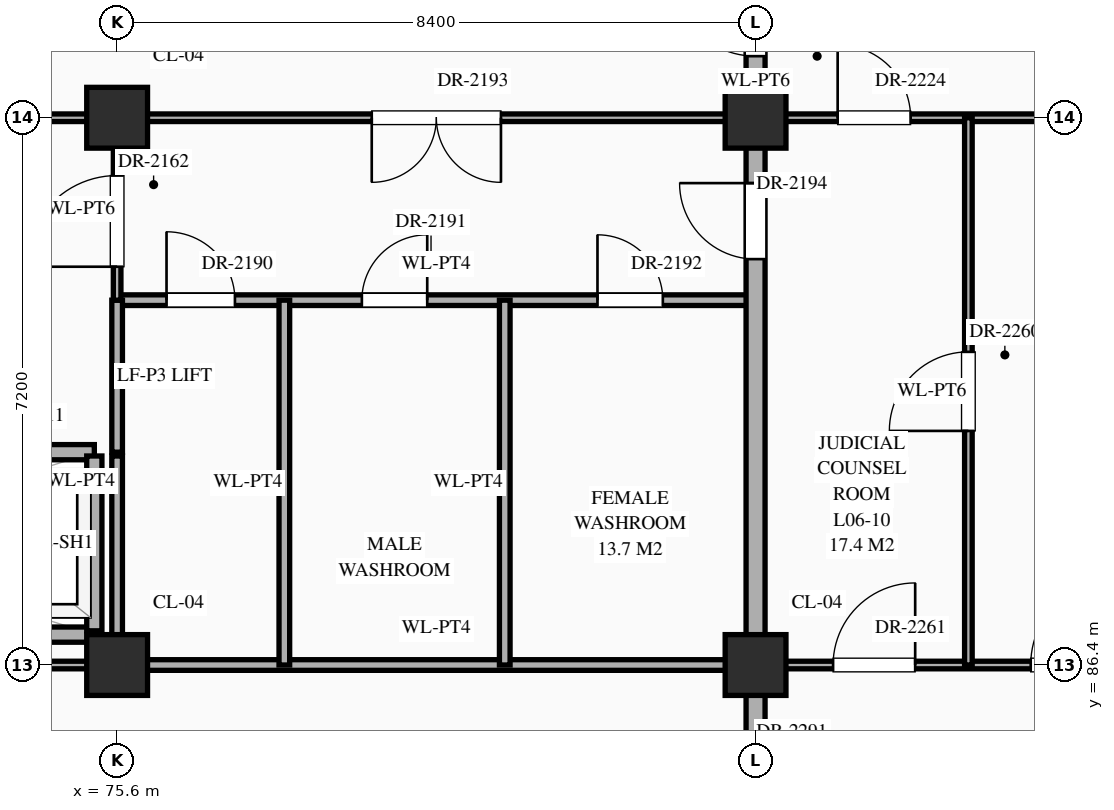
"""IFC4 building model, lengths in metres.
Left out: names, types, materials, properties, quantities, classifications, styles, units other than length and angle.
Written with IfcOpenShell. Run it as: python <this file> out.ifc"""

import sys

from ifc_helpers import new_model, si_unit, direction, frame, frame_2d, origin, origin_2d, place, context, subcontext, project, spatial, rectangle, extrude, element, fill, save


model = new_model("IFC4")
c1 = context("Model", 3, precision=1e-05, world=origin(), true_north=direction((0.0, 1.0)))
c2 = subcontext(c1, "Body", "Model", "MODEL_VIEW")
j1 = project(units=[si_unit("LENGTHUNIT", "METRE"), si_unit("PLANEANGLEUNIT", "RADIAN")], contexts=[c1])
p1 = place(None, origin())
s1 = spatial("IfcSite", under=j1, at=p1, CompositionType="ELEMENT")
p2 = place(p1, origin())
s2 = spatial("IfcBuilding", under=s1, at=p2, CompositionType="ELEMENT")
p3 = place(p2, frame((0.0, 0.0, 26.1)))
s3 = spatial("IfcBuildingStorey", under=s2, at=p3, CompositionType="ELEMENT", Elevation=26.1)
for number, where, z_axis, x_axis in (
    (1, (75.6, 86.4, 0.0), (0.0, 0.0, 1.0), (1.0, 0.0, 0.0)),
    (2, (75.6, 93.6, 0.0), (0.0, 0.0, 1.0), (1.0, 0.0, 0.0)),
    (3, (84.0, 86.4, 0.0), (0.0, 0.0, 1.0), (1.0, 0.0, 0.0)),
    (4, (84.0, 93.6, 0.0), (0.0, 0.0, 1.0), (1.0, 0.0, 0.0)),
):
    element("IfcColumn", number, at=place(p3, frame(where, z_axis=z_axis, x_axis=x_axis)), inside=s3, PredefinedType="COLUMN", context=c2, shape_type="SweptSolid", body=[
        extrude(rectangle(XDim=0.8, YDim=0.8, at=origin_2d()), origin(), (0.0, 0.0, 1.0), 4.5),
    ])
p4 = place(p3, frame((67.25, 86.4, 0.0), z_axis=(0.0, 0.0, 1.0), x_axis=(1.0, 0.0, 0.0)))
e5 = element("IfcWall", 5, at=p4, inside=s3, PredefinedType="STANDARD", context=c2, shape_type="SweptSolid", body=[
    extrude(rectangle(XDim=8.3, YDim=0.1, at=frame_2d((4.15, 0.0))), origin(), (0.0, 0.0, 1.0), 3.39),
])
p5 = place(p3, frame((75.6, 86.4, 0.0), z_axis=(0.0, 0.0, 1.0), x_axis=(1.0, 0.0, 0.0)))
e6 = element("IfcWall", 6, at=p5, inside=s3, PredefinedType="STANDARD", context=c2, shape_type="SweptSolid", body=[
    extrude(rectangle(XDim=8.4, YDim=0.14, at=frame_2d((4.2, 0.0))), origin(), (0.0, 0.0, 1.0), 3.39),
])
p6 = place(p3, frame((84.0, 86.4, 0.0), z_axis=(0.0, 0.0, 1.0), x_axis=(1.0, 0.0, 0.0)))
e7 = element("IfcWall", 7, at=p6, inside=s3, PredefinedType="STANDARD", context=c2, shape_type="SweptSolid", body=[
    extrude(rectangle(XDim=8.4, YDim=0.1, at=frame_2d((4.2, 0.0))), origin(), (0.0, 0.0, 1.0), 3.39),
])
p7 = place(p6, frame((1.02, 0.0, 0.0)))
e8 = element("IfcOpeningElement", 8, at=p7, cuts=e7, PredefinedType="OPENING", context=c2, shape_type="SweptSolid", body=[
    extrude(rectangle(XDim=1.08, YDim=2.25, at=frame_2d((0.54, 1.125))), frame((0.0, 0.062, 0.0), z_axis=(0.0, -1.0, 0.0), x_axis=(1.0, 0.0, 0.0)), (0.0, 0.0, 1.0), 0.124),
])
p8 = place(p6, frame((3.62, 0.0, 0.0)))
e9 = element("IfcOpeningElement", 9, at=p8, cuts=e7, PredefinedType="OPENING", context=c2, shape_type="SweptSolid", body=[
    extrude(rectangle(XDim=1.16, YDim=2.3, at=frame_2d((0.58, 1.15))), frame((0.0, 0.062, 0.0), z_axis=(0.0, -1.0, 0.0), x_axis=(1.0, 0.0, 0.0)), (0.0, 0.0, 1.0), 0.124),
])
p9 = place(p6, frame((6.24, 0.0, 0.0)))
e10 = element("IfcOpeningElement", 10, at=p9, cuts=e7, PredefinedType="OPENING", context=c2, shape_type="SweptSolid", body=[
    extrude(rectangle(XDim=1.2, YDim=2.35, at=frame_2d((0.6, 1.175))), frame((0.0, 0.062, 0.0), z_axis=(0.0, -1.0, 0.0), x_axis=(1.0, 0.0, 0.0)), (0.0, 0.0, 1.0), 0.124),
])
p10 = place(p3, frame((72.8, 86.8, 0.0), z_axis=(0.0, 0.0, 1.0), x_axis=(1.0, 0.0, 0.0)))
e11 = element("IfcWall", 11, at=p10, inside=s3, PredefinedType="STANDARD", context=c2, shape_type="SweptSolid", body=[
    extrude(rectangle(XDim=2.5, YDim=0.2, at=frame_2d((1.25, 0.0))), origin(), (0.0, 0.0, 1.0), 4.24),
])
p11 = place(p3, frame((67.6, 89.2, 0.0), z_axis=(0.0, 0.0, 1.0), x_axis=(1.0, 0.0, 0.0)))
e12 = element("IfcWall", 12, at=p11, inside=s3, PredefinedType="STANDARD", context=c2, shape_type="SweptSolid", body=[
    extrude(rectangle(XDim=7.7, YDim=0.2, at=frame_2d((3.85, 0.0))), origin(), (0.0, 0.0, 1.0), 4.24),
])
p12 = place(p11, frame((0.725, 0.0, 0.0)))
e13 = element("IfcOpeningElement", 13, at=p12, cuts=e12, PredefinedType="OPENING", context=c2, shape_type="SweptSolid", body=[
    extrude(rectangle(XDim=1.1, YDim=2.15, at=frame_2d((0.55, 1.075))), frame((0.0, 0.112, 0.0), z_axis=(0.0, -1.0, 0.0), x_axis=(1.0, 0.0, 0.0)), (0.0, 0.0, 1.0), 0.224),
])
p13 = place(p11, frame((3.3, 0.0, 0.0)))
e14 = element("IfcOpeningElement", 14, at=p13, cuts=e12, PredefinedType="OPENING", context=c2, shape_type="SweptSolid", body=[
    extrude(rectangle(XDim=1.1, YDim=2.15, at=frame_2d((0.55, 1.075))), frame((0.0, 0.112, 0.0), z_axis=(0.0, -1.0, 0.0), x_axis=(1.0, 0.0, 0.0)), (0.0, 0.0, 1.0), 0.224),
])
p14 = place(p11, frame((5.875, 0.0, 0.0)))
e15 = element("IfcOpeningElement", 15, at=p14, cuts=e12, PredefinedType="OPENING", context=c2, shape_type="SweptSolid", body=[
    extrude(rectangle(XDim=1.1, YDim=2.15, at=frame_2d((0.55, 1.075))), frame((0.0, 0.112, 0.0), z_axis=(0.0, -1.0, 0.0), x_axis=(1.0, 0.0, 0.0)), (0.0, 0.0, 1.0), 0.224),
])
p15 = place(p3, frame((75.6, 91.2, 0.0), z_axis=(0.0, 0.0, 1.0), x_axis=(1.0, 0.0, 0.0)))
e16 = element("IfcWall", 16, at=p15, inside=s3, PredefinedType="STANDARD", context=c2, shape_type="SweptSolid", body=[
    extrude(rectangle(XDim=8.4, YDim=0.14, at=frame_2d((4.2, 0.0))), origin(), (0.0, 0.0, 1.0), 4.24),
])
p16 = place(p15, frame((0.65, 0.0, 0.0)))
e17 = element("IfcOpeningElement", 17, at=p16, cuts=e16, PredefinedType="OPENING", context=c2, shape_type="SweptSolid", body=[
    extrude(rectangle(XDim=0.9, YDim=2.15, at=frame_2d((0.45, 1.075))), frame((0.0, 0.082, 0.0), z_axis=(0.0, -1.0, 0.0), x_axis=(1.0, 0.0, 0.0)), (0.0, 0.0, 1.0), 0.164),
])
p17 = place(p15, frame((3.22, 0.0, 0.0)))
e18 = element("IfcOpeningElement", 18, at=p17, cuts=e16, PredefinedType="OPENING", context=c2, shape_type="SweptSolid", body=[
    extrude(rectangle(XDim=0.86, YDim=2.1, at=frame_2d((0.43, 1.05))), frame((0.0, 0.082, 0.0), z_axis=(0.0, -1.0, 0.0), x_axis=(1.0, 0.0, 0.0)), (0.0, 0.0, 1.0), 0.164),
])
p18 = place(p15, frame((6.32, 0.0, 0.0)))
e19 = element("IfcOpeningElement", 19, at=p18, cuts=e16, PredefinedType="OPENING", context=c2, shape_type="SweptSolid", body=[
    extrude(rectangle(XDim=0.86, YDim=2.1, at=frame_2d((0.43, 1.05))), frame((0.0, 0.082, 0.0), z_axis=(0.0, -1.0, 0.0), x_axis=(1.0, 0.0, 0.0)), (0.0, 0.0, 1.0), 0.164),
])
p19 = place(p3, frame((67.2, 93.6, 0.0), z_axis=(0.0, 0.0, 1.0), x_axis=(1.0, 0.0, 0.0)))
e20 = element("IfcWall", 20, at=p19, inside=s3, PredefinedType="STANDARD", context=c2, shape_type="SweptSolid", body=[
    extrude(rectangle(XDim=33.6, YDim=0.1, at=frame_2d((16.8, 0.0))), origin(), (0.0, 0.0, 1.0), 3.39),
])
p20 = place(p19, frame((3.35, 0.0, 0.0)))
e21 = element("IfcOpeningElement", 21, at=p20, cuts=e20, PredefinedType="OPENING", context=c2, shape_type="SweptSolid", body=[
    extrude(rectangle(XDim=1.7, YDim=2.45, at=frame_2d((0.85, 1.225))), frame((0.0, 0.062, 0.0), z_axis=(0.0, -1.0, 0.0), x_axis=(1.0, 0.0, 0.0)), (0.0, 0.0, 1.0), 0.124),
])
p21 = place(p19, frame((28.675, 0.0, 0.0)))
e22 = element("IfcOpeningElement", 22, at=p21, cuts=e20, PredefinedType="OPENING", context=c2, shape_type="SweptSolid", body=[
    extrude(rectangle(XDim=1.45, YDim=2.3, at=frame_2d((0.725, 1.15))), frame((0.0, 0.062, 0.0), z_axis=(0.0, -1.0, 0.0), x_axis=(1.0, 0.0, 0.0)), (0.0, 0.0, 1.0), 0.124),
])
p22 = place(p19, frame((11.75, 0.0, 0.0)))
e23 = element("IfcOpeningElement", 23, at=p22, cuts=e20, PredefinedType="OPENING", context=c2, shape_type="SweptSolid", body=[
    extrude(rectangle(XDim=1.7, YDim=2.45, at=frame_2d((0.85, 1.225))), frame((0.0, 0.062, 0.0), z_axis=(0.0, -1.0, 0.0), x_axis=(1.0, 0.0, 0.0)), (0.0, 0.0, 1.0), 0.124),
])
p23 = place(p19, frame((17.88, 0.0, 0.0)))
e24 = element("IfcOpeningElement", 24, at=p23, cuts=e20, PredefinedType="OPENING", context=c2, shape_type="SweptSolid", body=[
    extrude(rectangle(XDim=0.96, YDim=2.2, at=frame_2d((0.48, 1.1))), frame((0.0, 0.062, 0.0), z_axis=(0.0, -1.0, 0.0), x_axis=(1.0, 0.0, 0.0)), (0.0, 0.0, 1.0), 0.124),
])
p24 = place(p19, frame((20.5, 0.0, 0.0)))
e25 = element("IfcOpeningElement", 25, at=p24, cuts=e20, PredefinedType="OPENING", context=c2, shape_type="SweptSolid", body=[
    extrude(rectangle(XDim=1.0, YDim=2.25, at=frame_2d((0.5, 1.125))), frame((0.0, 0.062, 0.0), z_axis=(0.0, -1.0, 0.0), x_axis=(1.0, 0.0, 0.0)), (0.0, 0.0, 1.0), 0.124),
])
p25 = place(p19, frame((23.12, 0.0, 0.0)))
e26 = element("IfcOpeningElement", 26, at=p25, cuts=e20, PredefinedType="OPENING", context=c2, shape_type="SweptSolid", body=[
    extrude(rectangle(XDim=1.04, YDim=2.2, at=frame_2d((0.52, 1.1))), frame((0.0, 0.062, 0.0), z_axis=(0.0, -1.0, 0.0), x_axis=(1.0, 0.0, 0.0)), (0.0, 0.0, 1.0), 0.124),
])
p26 = place(p3, frame((75.3, 86.85, 0.0), z_axis=(0.0, 0.0, 1.0), x_axis=(0.0, 1.0, 0.0)))
e27 = element("IfcWall", 27, at=p26, inside=s3, PredefinedType="STANDARD", context=c2, shape_type="SweptSolid", body=[
    extrude(rectangle(XDim=2.3, YDim=0.2, at=frame_2d((1.15, 0.0))), origin(), (0.0, 0.0, 1.0), 4.24),
])
p27 = place(p3, frame((75.6, 86.45, 0.0), z_axis=(0.0, 0.0, 1.0), x_axis=(0.0, 1.0, 0.0)))
e28 = element("IfcWall", 28, at=p27, inside=s3, PredefinedType="STANDARD", context=c2, shape_type="SweptSolid", body=[
    extrude(rectangle(XDim=2.7, YDim=0.14, at=frame_2d((1.35, 0.0))), origin(), (0.0, 0.0, 1.0), 3.49),
])
p28 = place(p3, frame((75.6, 89.2, 0.0), z_axis=(0.0, 0.0, 1.0), x_axis=(0.0, 1.0, 0.0)))
e29 = element("IfcWall", 29, at=p28, inside=s3, PredefinedType="STANDARD", context=c2, shape_type="SweptSolid", body=[
    extrude(rectangle(XDim=2.0, YDim=0.14, at=frame_2d((1.0, 0.0))), origin(), (0.0, 0.0, 1.0), 3.49),
])
p29 = place(p3, frame((75.6, 91.2, 0.0), z_axis=(0.0, 0.0, 1.0), x_axis=(0.0, 1.0, 0.0)))
e30 = element("IfcWall", 30, at=p29, inside=s3, PredefinedType="STANDARD", context=c2, shape_type="SweptSolid", body=[
    extrude(rectangle(XDim=2.4, YDim=0.1, at=frame_2d((1.2, 0.0))), origin(), (0.0, 0.0, 1.0), 3.49),
])
p30 = place(p29, frame((0.44, 0.0, 0.0)))
e31 = element("IfcOpeningElement", 31, at=p30, cuts=e30, PredefinedType="OPENING", context=c2, shape_type="SweptSolid", body=[
    extrude(rectangle(XDim=1.2, YDim=2.35, at=frame_2d((0.6, 1.175))), frame((0.0, 0.062, 0.0), z_axis=(0.0, -1.0, 0.0), x_axis=(1.0, 0.0, 0.0)), (0.0, 0.0, 1.0), 0.124),
])
for number, where, z_axis, x_axis in (
    (32, (77.8, 86.4, 0.0), (0.0, 0.0, 1.0), (0.0, 1.0, 0.0)),
    (33, (80.7, 86.4, 0.0), (0.0, 0.0, 1.0), (0.0, 1.0, 0.0)),
):
    element("IfcWall", number, at=place(p3, frame(where, z_axis=z_axis, x_axis=x_axis)), inside=s3, PredefinedType="STANDARD", context=c2, shape_type="SweptSolid", body=[
        extrude(rectangle(XDim=4.8, YDim=0.14, at=frame_2d((2.4, 0.0))), origin(), (0.0, 0.0, 1.0), 4.24),
    ])
p31 = place(p3, frame((84.0, 79.24, 0.0), z_axis=(0.0, 0.0, 1.0), x_axis=(0.0, 1.0, 0.0)))
e34 = element("IfcWall", 34, at=p31, inside=s3, PredefinedType="STANDARD", context=c2, shape_type="SweptSolid", body=[
    extrude(rectangle(XDim=35.92, YDim=0.25, at=frame_2d((17.96, 0.0))), origin(), (0.0, 0.0, 1.0), 3.49),
])
p32 = place(p31, frame((22.62, 0.0, 0.0)))
e35 = element("IfcOpeningElement", 35, at=p32, cuts=e34, PredefinedType="OPENING", context=c2, shape_type="SweptSolid", body=[
    extrude(rectangle(XDim=1.8, YDim=2.35, at=frame_2d((0.9, 1.175))), frame((0.0, 0.137, 0.0), z_axis=(0.0, -1.0, 0.0), x_axis=(1.0, 0.0, 0.0)), (0.0, 0.0, 1.0), 0.274),
])
p33 = place(p31, frame((12.5, 0.0, 0.0)))
e36 = element("IfcOpeningElement", 36, at=p33, cuts=e34, PredefinedType="OPENING", context=c2, shape_type="SweptSolid", body=[
    extrude(rectangle(XDim=1.0, YDim=2.2, at=frame_2d((0.5, 1.1))), frame((0.0, 0.137, 0.0), z_axis=(0.0, -1.0, 0.0), x_axis=(1.0, 0.0, 0.0)), (0.0, 0.0, 1.0), 0.274),
])
p34 = place(p31, frame((15.17, 0.0, 0.0)))
e37 = element("IfcOpeningElement", 37, at=p34, cuts=e34, PredefinedType="OPENING", context=c2, shape_type="SweptSolid", body=[
    extrude(rectangle(XDim=1.1, YDim=2.2, at=frame_2d((0.55, 1.1))), frame((0.0, 0.137, 0.0), z_axis=(0.0, -1.0, 0.0), x_axis=(1.0, 0.0, 0.0)), (0.0, 0.0, 1.0), 0.274),
])
p35 = place(p31, frame((26.05, 0.0, 0.0)))
e38 = element("IfcOpeningElement", 38, at=p35, cuts=e34, PredefinedType="OPENING", context=c2, shape_type="SweptSolid", body=[
    extrude(rectangle(XDim=1.5, YDim=2.25, at=frame_2d((0.75, 1.125))), frame((0.0, 0.137, 0.0), z_axis=(0.0, -1.0, 0.0), x_axis=(1.0, 0.0, 0.0)), (0.0, 0.0, 1.0), 0.274),
])
p36 = place(p31, frame((29.645, 0.0, 0.0)))
e39 = element("IfcOpeningElement", 39, at=p36, cuts=e34, PredefinedType="OPENING", context=c2, shape_type="SweptSolid", body=[
    extrude(rectangle(XDim=0.95, YDim=2.15, at=frame_2d((0.475, 1.075))), frame((0.0, 0.137, 0.0), z_axis=(0.0, -1.0, 0.0), x_axis=(1.0, 0.0, 0.0)), (0.0, 0.0, 1.0), 0.274),
])
p37 = place(p31, frame((5.325, 0.0, 0.0)))
e40 = element("IfcOpeningElement", 40, at=p37, cuts=e34, PredefinedType="OPENING", context=c2, shape_type="SweptSolid", body=[
    extrude(rectangle(XDim=0.95, YDim=2.15, at=frame_2d((0.475, 1.075))), frame((0.0, 0.137, 0.0), z_axis=(0.0, -1.0, 0.0), x_axis=(1.0, 0.0, 0.0)), (0.0, 0.0, 1.0), 0.274),
])
p38 = place(p3, frame((86.8, 86.4, 0.0), z_axis=(0.0, 0.0, 1.0), x_axis=(0.0, 1.0, 0.0)))
e41 = element("IfcWall", 41, at=p38, inside=s3, PredefinedType="STANDARD", context=c2, shape_type="SweptSolid", body=[
    extrude(rectangle(XDim=7.2, YDim=0.1, at=frame_2d((3.6, 0.0))), origin(), (0.0, 0.0, 1.0), 4.24),
])
p39 = place(p38, frame((3.08, 0.0, 0.0)))
e42 = element("IfcOpeningElement", 42, at=p39, cuts=e41, PredefinedType="OPENING", context=c2, shape_type="SweptSolid", body=[
    extrude(rectangle(XDim=1.04, YDim=2.2, at=frame_2d((0.52, 1.1))), frame((0.0, 0.062, 0.0), z_axis=(0.0, -1.0, 0.0), x_axis=(1.0, 0.0, 0.0)), (0.0, 0.0, 1.0), 0.124),
])
p40 = place(p30, origin())
e43 = element("IfcDoor", 43, at=p40, inside=s3, OperationType="SINGLE_SWING_LEFT", PredefinedType="DOOR", context=c2, shape_type="SweptSolid", body=[
    extrude(rectangle(XDim=1.2, YDim=2.35, at=frame_2d((0.6, 1.175))), frame((0.0, 0.025, 0.0), z_axis=(0.0, -1.0, 0.0), x_axis=(1.0, 0.0, 0.0)), (0.0, 0.0, 1.0), 0.05),
])
fill(e31, e43)
p41 = place(p16, origin())
e44 = element("IfcDoor", 44, at=p41, inside=s3, OperationType="SINGLE_SWING_LEFT", PredefinedType="DOOR", context=c2, shape_type="SweptSolid", body=[
    extrude(rectangle(XDim=0.9, YDim=2.15, at=frame_2d((0.45, 1.075))), frame((0.0, 0.025, 0.0), z_axis=(0.0, -1.0, 0.0), x_axis=(1.0, 0.0, 0.0)), (0.0, 0.0, 1.0), 0.05),
])
fill(e17, e44)
p42 = place(p17, origin())
e45 = element("IfcDoor", 45, at=p42, inside=s3, OperationType="SINGLE_SWING_RIGHT", PredefinedType="DOOR", context=c2, shape_type="SweptSolid", body=[
    extrude(rectangle(XDim=0.86, YDim=2.1, at=frame_2d((0.43, 1.05))), frame((0.0, 0.025, 0.0), z_axis=(0.0, -1.0, 0.0), x_axis=(1.0, 0.0, 0.0)), (0.0, 0.0, 1.0), 0.05),
])
fill(e18, e45)
p43 = place(p18, origin())
e46 = element("IfcDoor", 46, at=p43, inside=s3, OperationType="SINGLE_SWING_LEFT", PredefinedType="DOOR", context=c2, shape_type="SweptSolid", body=[
    extrude(rectangle(XDim=0.86, YDim=2.1, at=frame_2d((0.43, 1.05))), frame((0.0, 0.025, 0.0), z_axis=(0.0, -1.0, 0.0), x_axis=(1.0, 0.0, 0.0)), (0.0, 0.0, 1.0), 0.05),
])
fill(e19, e46)
p44 = place(p22, frame((1.7, 0.0, 0.0), z_axis=(0.0, 0.0, 1.0), x_axis=(-1.0, 0.0, 0.0)))
e47 = element("IfcDoor", 47, at=p44, inside=s3, OperationType="DOUBLE_DOOR_SINGLE_SWING", PredefinedType="DOOR", context=c2, shape_type="SweptSolid", body=[
    extrude(rectangle(XDim=1.7, YDim=2.45, at=frame_2d((0.85, 1.225))), frame((0.0, 0.025, 0.0), z_axis=(0.0, -1.0, 0.0), x_axis=(1.0, 0.0, 0.0)), (0.0, 0.0, 1.0), 0.05),
])
fill(e23, e47)
p45 = place(p33, origin())
e48 = element("IfcDoor", 48, at=p45, inside=s3, OperationType="SINGLE_SWING_RIGHT", PredefinedType="DOOR", context=c2, shape_type="SweptSolid", body=[
    extrude(rectangle(XDim=1.0, YDim=2.2, at=frame_2d((0.5, 1.1))), frame((0.0, 0.025, 0.0), z_axis=(0.0, -1.0, 0.0), x_axis=(1.0, 0.0, 0.0)), (0.0, 0.0, 1.0), 0.05),
])
fill(e36, e48)
p46 = place(p34, origin())
e49 = element("IfcDoor", 49, at=p46, inside=s3, OperationType="SINGLE_SWING_RIGHT", PredefinedType="DOOR", context=c2, shape_type="SweptSolid", body=[
    extrude(rectangle(XDim=1.1, YDim=2.2, at=frame_2d((0.55, 1.1))), frame((0.0, 0.025, 0.0), z_axis=(0.0, -1.0, 0.0), x_axis=(1.0, 0.0, 0.0)), (0.0, 0.0, 1.0), 0.05),
])
fill(e37, e49)
p47 = place(p23, origin())
e50 = element("IfcDoor", 50, at=p47, inside=s3, OperationType="SINGLE_SWING_LEFT", PredefinedType="DOOR", context=c2, shape_type="SweptSolid", body=[
    extrude(rectangle(XDim=0.96, YDim=2.2, at=frame_2d((0.48, 1.1))), frame((0.0, 0.025, 0.0), z_axis=(0.0, -1.0, 0.0), x_axis=(1.0, 0.0, 0.0)), (0.0, 0.0, 1.0), 0.05),
])
fill(e24, e50)
p48 = place(p39, origin())
e51 = element("IfcDoor", 51, at=p48, inside=s3, OperationType="SINGLE_SWING_LEFT", PredefinedType="DOOR", context=c2, shape_type="SweptSolid", body=[
    extrude(rectangle(XDim=1.04, YDim=2.2, at=frame_2d((0.52, 1.1))), frame((0.0, 0.025, 0.0), z_axis=(0.0, -1.0, 0.0), x_axis=(1.0, 0.0, 0.0)), (0.0, 0.0, 1.0), 0.05),
])
fill(e42, e51)
p49 = place(p7, origin())
e52 = element("IfcDoor", 52, at=p49, inside=s3, OperationType="SINGLE_SWING_RIGHT", PredefinedType="DOOR", context=c2, shape_type="SweptSolid", body=[
    extrude(rectangle(XDim=1.08, YDim=2.25, at=frame_2d((0.54, 1.125))), frame((0.0, 0.025, 0.0), z_axis=(0.0, -1.0, 0.0), x_axis=(1.0, 0.0, 0.0)), (0.0, 0.0, 1.0), 0.05),
])
fill(e8, e52)
p50 = place(p8, origin())
e53 = element("IfcDoor", 53, at=p50, inside=s3, OperationType="SINGLE_SWING_RIGHT", PredefinedType="DOOR", context=c2, shape_type="SweptSolid", body=[
    extrude(rectangle(XDim=1.16, YDim=2.3, at=frame_2d((0.58, 1.15))), frame((0.0, 0.025, 0.0), z_axis=(0.0, -1.0, 0.0), x_axis=(1.0, 0.0, 0.0)), (0.0, 0.0, 1.0), 0.05),
])
fill(e9, e53)
save(model, sys.argv[1])
